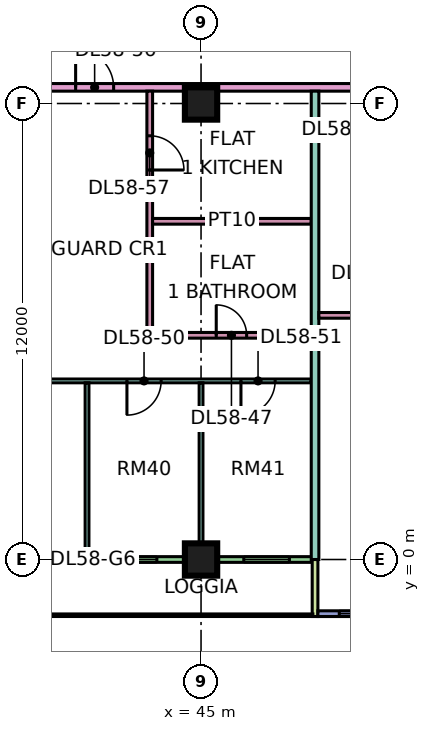
"""IFC4 building model, lengths in metres.
Left out: names, types, materials, properties, quantities, classifications, styles, units other than length and angle.
Written with IfcOpenShell. Run it as: python <this file> out.ifc"""

import sys

from ifc_helpers import new_model, si_unit, direction, frame, frame_2d, origin, origin_2d, place, context, subcontext, project, spatial, rectangle, extrude, element, fill, save


model = new_model("IFC4")
c1 = context("Model", 3, precision=1e-05, world=origin(), true_north=direction((0.0, 1.0)))
c2 = subcontext(c1, "Body", "Model", "MODEL_VIEW")
j1 = project(units=[si_unit("LENGTHUNIT", "METRE"), si_unit("PLANEANGLEUNIT", "RADIAN")], contexts=[c1])
p1 = place(None, origin())
s1 = spatial("IfcSite", under=j1, at=p1, CompositionType="ELEMENT")
p2 = place(p1, origin())
s2 = spatial("IfcBuilding", under=s1, at=p2, CompositionType="ELEMENT")
p3 = place(p2, frame((0.0, 0.0, 245.4)))
s3 = spatial("IfcBuildingStorey", under=s2, at=p3, CompositionType="ELEMENT", Elevation=245.4)
for number, where, z_axis, x_axis in (
    (1, (45.0, 0.0, 0.0), (0.0, 0.0, 1.0), (1.0, 0.0, 0.0)),
    (2, (45.0, 12.0, 0.0), (0.0, 0.0, 1.0), (1.0, 0.0, 0.0)),
):
    element("IfcColumn", number, at=place(p3, frame(where, z_axis=z_axis, x_axis=x_axis)), inside=s3, PredefinedType="COLUMN", context=c2, shape_type="SweptSolid", body=[
        extrude(rectangle(XDim=0.85, YDim=0.85, at=origin_2d()), origin(), (0.0, 0.0, 1.0), 3.75),
    ])
p4 = place(p3, frame((36.075, 0.0, 0.0), z_axis=(0.0, 0.0, 1.0), x_axis=(1.0, 0.0, 0.0)))
e3 = element("IfcWall", 3, at=p4, inside=s3, PredefinedType="SOLIDWALL", context=c2, shape_type="SweptSolid", body=[
    extrude(rectangle(XDim=11.85, YDim=0.15, at=frame_2d((5.925, 0.0))), origin(), (0.0, 0.0, 1.0), 3.35),
])
p5 = place(p4, frame((2.288, 0.0, 0.0)))
e4 = element("IfcOpeningElement", 4, at=p5, cuts=e3, PredefinedType="OPENING", context=c2, shape_type="SweptSolid", body=[
    extrude(rectangle(XDim=1.8, YDim=2.4, at=frame_2d((0.9, 1.2))), frame((0.0, 0.085, 0.0), z_axis=(0.0, -1.0, 0.0), x_axis=(1.0, 0.0, 0.0)), (0.0, 0.0, 1.0), 0.17),
])
p6 = place(p4, frame((6.562, 0.0, 0.45)))
e5 = element("IfcOpeningElement", 5, at=p6, cuts=e3, PredefinedType="OPENING", context=c2, shape_type="SweptSolid", body=[
    extrude(rectangle(XDim=1.2, YDim=2.4, at=frame_2d((0.6, 1.2))), frame((0.0, 0.085, 0.0), z_axis=(0.0, -1.0, 0.0), x_axis=(1.0, 0.0, 0.0)), (0.0, 0.0, 1.0), 0.17),
])
p7 = place(p4, frame((10.05, 0.0, 0.45)))
e6 = element("IfcOpeningElement", 6, at=p7, cuts=e3, PredefinedType="OPENING", context=c2, shape_type="SweptSolid", body=[
    extrude(rectangle(XDim=1.2, YDim=2.4, at=frame_2d((0.6, 1.2))), frame((0.0, 0.085, 0.0), z_axis=(0.0, -1.0, 0.0), x_axis=(1.0, 0.0, 0.0)), (0.0, 0.0, 1.0), 0.17),
])
p8 = place(p3, frame((48.0, -1.5, 0.0), z_axis=(0.0, 0.0, 1.0), x_axis=(0.0, 1.0, 0.0)))
e7 = element("IfcWall", 7, at=p8, inside=s3, PredefinedType="SOLIDWALL", context=c2, shape_type="SweptSolid", body=[
    extrude(rectangle(XDim=1.5, YDim=0.15, at=frame_2d((0.75, 0.0))), origin(), (0.0, 0.0, 1.0), 3.35),
])
p9 = place(p3, frame((48.075, -1.425, 0.0), z_axis=(0.0, 0.0, 1.0), x_axis=(1.0, 0.0, 0.0)))
e8 = element("IfcWall", 8, at=p9, inside=s3, PredefinedType="SOLIDWALL", context=c2, shape_type="SweptSolid", body=[
    extrude(rectangle(XDim=13.425, YDim=0.15, at=frame_2d((6.712, 0.0))), origin(), (0.0, 0.0, 1.0), 3.35),
])
p10 = place(p9, frame((0.562, 0.0, 0.45)))
e9 = element("IfcOpeningElement", 9, at=p10, cuts=e8, PredefinedType="OPENING", context=c2, shape_type="SweptSolid", body=[
    extrude(rectangle(XDim=1.8, YDim=2.4, at=frame_2d((0.9, 1.2))), frame((0.0, 0.085, 0.0), z_axis=(0.0, -1.0, 0.0), x_axis=(1.0, 0.0, 0.0)), (0.0, 0.0, 1.0), 0.17),
])
p11 = place(p9, frame((4.425, 0.0, 0.45)))
e10 = element("IfcOpeningElement", 10, at=p11, cuts=e8, PredefinedType="OPENING", context=c2, shape_type="SweptSolid", body=[
    extrude(rectangle(XDim=3.0, YDim=2.4, at=frame_2d((1.5, 1.2))), frame((0.0, 0.085, 0.0), z_axis=(0.0, -1.0, 0.0), x_axis=(1.0, 0.0, 0.0)), (0.0, 0.0, 1.0), 0.17),
])
p12 = place(p9, frame((9.375, 0.0, 0.45)))
e11 = element("IfcOpeningElement", 11, at=p12, cuts=e8, PredefinedType="OPENING", context=c2, shape_type="SweptSolid", body=[
    extrude(rectangle(XDim=3.6, YDim=2.4, at=frame_2d((1.8, 1.2))), frame((0.0, 0.085, 0.0), z_axis=(0.0, -1.0, 0.0), x_axis=(1.0, 0.0, 0.0)), (0.0, 0.0, 1.0), 0.17),
])
p13 = place(p3, frame((33.05, 4.7, 0.0), z_axis=(0.0, 0.0, 1.0), x_axis=(1.0, 0.0, 0.0)))
e12 = element("IfcWall", 12, at=p13, inside=s3, PredefinedType="PARTITIONING", context=c2, shape_type="SweptSolid", body=[
    extrude(rectangle(XDim=14.85, YDim=0.1, at=frame_2d((7.425, 0.0))), origin(), (0.0, 0.0, 1.0), 3.35),
])
p14 = place(p13, frame((10.0, 0.0, 0.0)))
e13 = element("IfcOpeningElement", 13, at=p14, cuts=e12, PredefinedType="OPENING", context=c2, shape_type="SweptSolid", body=[
    extrude(rectangle(XDim=0.9, YDim=2.1, at=frame_2d((0.45, 1.05))), frame((0.0, 0.06, 0.0), z_axis=(0.0, -1.0, 0.0), x_axis=(1.0, 0.0, 0.0)), (0.0, 0.0, 1.0), 0.12),
])
p15 = place(p13, frame((13.0, 0.0, 0.0)))
e14 = element("IfcOpeningElement", 14, at=p15, cuts=e12, PredefinedType="OPENING", context=c2, shape_type="SweptSolid", body=[
    extrude(rectangle(XDim=0.9, YDim=2.1, at=frame_2d((0.45, 1.05))), frame((0.0, 0.06, 0.0), z_axis=(0.0, -1.0, 0.0), x_axis=(1.0, 0.0, 0.0)), (0.0, 0.0, 1.0), 0.12),
])
p16 = place(p13, frame((4.0, 0.0, 0.0)))
e15 = element("IfcOpeningElement", 15, at=p16, cuts=e12, PredefinedType="OPENING", context=c2, shape_type="SweptSolid", body=[
    extrude(rectangle(XDim=0.9, YDim=2.1, at=frame_2d((0.45, 1.05))), frame((0.0, 0.06, 0.0), z_axis=(0.0, -1.0, 0.0), x_axis=(1.0, 0.0, 0.0)), (0.0, 0.0, 1.0), 0.12),
])
p17 = place(p3, frame((40.65, 12.425, 0.0), z_axis=(0.0, 0.0, 1.0), x_axis=(1.0, 0.0, 0.0)))
e16 = element("IfcWall", 16, at=p17, inside=s3, PredefinedType="PARTITIONING", context=c2, shape_type="SweptSolid", body=[
    extrude(rectangle(XDim=22.276, YDim=0.2, at=frame_2d((11.138, 0.0))), origin(), (0.0, 0.0, 1.0), 3.35),
])
p18 = place(p17, frame((8.7, 0.0, 0.0)))
e17 = element("IfcOpeningElement", 17, at=p18, cuts=e16, PredefinedType="OPENING", context=c2, shape_type="SweptSolid", body=[
    extrude(rectangle(XDim=1.0, YDim=2.1, at=frame_2d((0.5, 1.05))), frame((0.0, 0.11, 0.0), z_axis=(0.0, -1.0, 0.0), x_axis=(1.0, 0.0, 0.0)), (0.0, 0.0, 1.0), 0.22),
])
p19 = place(p17, frame((1.05, 0.0, 0.0)))
e18 = element("IfcOpeningElement", 18, at=p19, cuts=e16, PredefinedType="OPENING", context=c2, shape_type="SweptSolid", body=[
    extrude(rectangle(XDim=1.0, YDim=2.1, at=frame_2d((0.5, 1.05))), frame((0.0, 0.11, 0.0), z_axis=(0.0, -1.0, 0.0), x_axis=(1.0, 0.0, 0.0)), (0.0, 0.0, 1.0), 0.22),
])
p20 = place(p3, frame((42.0, 0.074, 0.0), z_axis=(0.0, 0.0, 1.0), x_axis=(0.0, 1.0, 0.0)))
e19 = element("IfcWall", 19, at=p20, inside=s3, PredefinedType="PARTITIONING", context=c2, shape_type="SweptSolid", body=[
    extrude(rectangle(XDim=4.576, YDim=0.1, at=frame_2d((2.288, 0.0))), origin(), (0.0, 0.0, 1.0), 3.35),
])
p21 = place(p3, frame((43.65, 5.825, 0.0), z_axis=(0.0, 0.0, 1.0), x_axis=(0.0, 1.0, 0.0)))
e20 = element("IfcWall", 20, at=p21, inside=s3, PredefinedType="PARTITIONING", context=c2, shape_type="SweptSolid", body=[
    extrude(rectangle(XDim=6.5, YDim=0.15, at=frame_2d((3.25, 0.0))), origin(), (0.0, 0.0, 1.0), 3.35),
])
p22 = place(p21, frame((4.425, 0.0, 0.0)))
e21 = element("IfcOpeningElement", 21, at=p22, cuts=e20, PredefinedType="OPENING", context=c2, shape_type="SweptSolid", body=[
    extrude(rectangle(XDim=0.9, YDim=2.1, at=frame_2d((0.45, 1.05))), frame((0.0, 0.085, 0.0), z_axis=(0.0, -1.0, 0.0), x_axis=(1.0, 0.0, 0.0)), (0.0, 0.0, 1.0), 0.17),
])
p23 = place(p3, frame((43.725, 5.9, 0.0), z_axis=(0.0, 0.0, 1.0), x_axis=(1.0, 0.0, 0.0)))
e22 = element("IfcWall", 22, at=p23, inside=s3, PredefinedType="PARTITIONING", context=c2, shape_type="SweptSolid", body=[
    extrude(rectangle(XDim=4.175, YDim=0.15, at=frame_2d((2.087, 0.0))), origin(), (0.0, 0.0, 1.0), 3.35),
])
p24 = place(p23, frame((1.675, 0.0, 0.0)))
e23 = element("IfcOpeningElement", 23, at=p24, cuts=e22, PredefinedType="OPENING", context=c2, shape_type="SweptSolid", body=[
    extrude(rectangle(XDim=0.8, YDim=2.1, at=frame_2d((0.4, 1.05))), frame((0.0, 0.085, 0.0), z_axis=(0.0, -1.0, 0.0), x_axis=(1.0, 0.0, 0.0)), (0.0, 0.0, 1.0), 0.17),
])
p25 = place(p3, frame((43.725, 8.9, 0.0), z_axis=(0.0, 0.0, 1.0), x_axis=(1.0, 0.0, 0.0)))
e24 = element("IfcWall", 24, at=p25, inside=s3, PredefinedType="PARTITIONING", context=c2, shape_type="SweptSolid", body=[
    extrude(rectangle(XDim=4.175, YDim=0.15, at=frame_2d((2.087, 0.0))), origin(), (0.0, 0.0, 1.0), 3.35),
])
p26 = place(p3, frame((45.0, 0.074, 0.0), z_axis=(0.0, 0.0, 1.0), x_axis=(0.0, 1.0, 0.0)))
e25 = element("IfcWall", 25, at=p26, inside=s3, PredefinedType="PARTITIONING", context=c2, shape_type="SweptSolid", body=[
    extrude(rectangle(XDim=4.576, YDim=0.1, at=frame_2d((2.288, 0.0))), origin(), (0.0, 0.0, 1.0), 3.35),
])
p27 = place(p3, frame((48.0, 0.0, 0.0), z_axis=(0.0, 0.0, 1.0), x_axis=(0.0, 1.0, 0.0)))
e26 = element("IfcWall", 26, at=p27, inside=s3, PredefinedType="PARTITIONING", context=c2, shape_type="SweptSolid", body=[
    extrude(rectangle(XDim=12.325, YDim=0.2, at=frame_2d((6.163, 0.0))), origin(), (0.0, 0.0, 1.0), 3.35),
])
p28 = place(p3, frame((48.1, 6.425, 0.0), z_axis=(0.0, 0.0, 1.0), x_axis=(1.0, 0.0, 0.0)))
e27 = element("IfcWall", 27, at=p28, inside=s3, PredefinedType="PARTITIONING", context=c2, shape_type="SweptSolid", body=[
    extrude(rectangle(XDim=8.95, YDim=0.15, at=frame_2d((4.475, 0.0))), origin(), (0.0, 0.0, 1.0), 3.35),
])
p29 = place(p28, frame((0.95, 0.0, 0.0)))
e28 = element("IfcOpeningElement", 28, at=p29, cuts=e27, PredefinedType="OPENING", context=c2, shape_type="SweptSolid", body=[
    extrude(rectangle(XDim=0.9, YDim=2.1, at=frame_2d((0.45, 1.05))), frame((0.0, 0.085, 0.0), z_axis=(0.0, -1.0, 0.0), x_axis=(1.0, 0.0, 0.0)), (0.0, 0.0, 1.0), 0.17),
])
p30 = place(p28, frame((6.95, 0.0, 0.0)))
e29 = element("IfcOpeningElement", 29, at=p30, cuts=e27, PredefinedType="OPENING", context=c2, shape_type="SweptSolid", body=[
    extrude(rectangle(XDim=0.9, YDim=2.1, at=frame_2d((0.45, 1.05))), frame((0.0, 0.085, 0.0), z_axis=(0.0, -1.0, 0.0), x_axis=(1.0, 0.0, 0.0)), (0.0, 0.0, 1.0), 0.17),
])
p31 = place(p6, origin())
e30 = element("IfcWindow", 30, at=p31, inside=s3, PartitioningType="SINGLE_PANEL", PredefinedType="WINDOW", context=c2, shape_type="SweptSolid", body=[
    extrude(rectangle(XDim=1.2, YDim=2.4, at=frame_2d((0.6, 1.2))), frame((0.0, 0.03, 0.0), z_axis=(0.0, -1.0, 0.0), x_axis=(1.0, 0.0, 0.0)), (0.0, 0.0, 1.0), 0.06),
])
fill(e5, e30)
p32 = place(p7, origin())
e31 = element("IfcWindow", 31, at=p32, inside=s3, PartitioningType="SINGLE_PANEL", PredefinedType="WINDOW", context=c2, shape_type="SweptSolid", body=[
    extrude(rectangle(XDim=1.2, YDim=2.4, at=frame_2d((0.6, 1.2))), frame((0.0, 0.03, 0.0), z_axis=(0.0, -1.0, 0.0), x_axis=(1.0, 0.0, 0.0)), (0.0, 0.0, 1.0), 0.06),
])
fill(e6, e31)
p33 = place(p10, origin())
e32 = element("IfcWindow", 32, at=p33, inside=s3, PartitioningType="SINGLE_PANEL", PredefinedType="WINDOW", context=c2, shape_type="SweptSolid", body=[
    extrude(rectangle(XDim=1.8, YDim=2.4, at=frame_2d((0.9, 1.2))), frame((0.0, 0.03, 0.0), z_axis=(0.0, -1.0, 0.0), x_axis=(1.0, 0.0, 0.0)), (0.0, 0.0, 1.0), 0.06),
])
fill(e9, e32)
p34 = place(p24, origin())
e33 = element("IfcDoor", 33, at=p34, inside=s3, OperationType="SINGLE_SWING_LEFT", PredefinedType="DOOR", context=c2, shape_type="SweptSolid", body=[
    extrude(rectangle(XDim=0.8, YDim=2.1, at=frame_2d((0.4, 1.05))), frame((0.0, 0.025, 0.0), z_axis=(0.0, -1.0, 0.0), x_axis=(1.0, 0.0, 0.0)), (0.0, 0.0, 1.0), 0.05),
])
fill(e23, e33)
p35 = place(p14, frame((0.9, 0.0, 0.0), z_axis=(0.0, 0.0, 1.0), x_axis=(-1.0, 0.0, 0.0)))
e34 = element("IfcDoor", 34, at=p35, inside=s3, OperationType="SINGLE_SWING_LEFT", PredefinedType="DOOR", context=c2, shape_type="SweptSolid", body=[
    extrude(rectangle(XDim=0.9, YDim=2.1, at=frame_2d((0.45, 1.05))), frame((0.0, 0.025, 0.0), z_axis=(0.0, -1.0, 0.0), x_axis=(1.0, 0.0, 0.0)), (0.0, 0.0, 1.0), 0.05),
])
fill(e13, e34)
p36 = place(p15, frame((0.9, 0.0, 0.0), z_axis=(0.0, 0.0, 1.0), x_axis=(-1.0, 0.0, 0.0)))
e35 = element("IfcDoor", 35, at=p36, inside=s3, OperationType="SINGLE_SWING_LEFT", PredefinedType="DOOR", context=c2, shape_type="SweptSolid", body=[
    extrude(rectangle(XDim=0.9, YDim=2.1, at=frame_2d((0.45, 1.05))), frame((0.0, 0.025, 0.0), z_axis=(0.0, -1.0, 0.0), x_axis=(1.0, 0.0, 0.0)), (0.0, 0.0, 1.0), 0.05),
])
fill(e14, e35)
p37 = place(p19, origin())
e36 = element("IfcDoor", 36, at=p37, inside=s3, OperationType="SINGLE_SWING_LEFT", PredefinedType="DOOR", context=c2, shape_type="SweptSolid", body=[
    extrude(rectangle(XDim=1.0, YDim=2.1, at=frame_2d((0.5, 1.05))), frame((0.0, 0.025, 0.0), z_axis=(0.0, -1.0, 0.0), x_axis=(1.0, 0.0, 0.0)), (0.0, 0.0, 1.0), 0.05),
])
fill(e18, e36)
p38 = place(p22, frame((0.9, 0.0, 0.0), z_axis=(0.0, 0.0, 1.0), x_axis=(-1.0, 0.0, 0.0)))
e37 = element("IfcDoor", 37, at=p38, inside=s3, OperationType="SINGLE_SWING_LEFT", PredefinedType="DOOR", context=c2, shape_type="SweptSolid", body=[
    extrude(rectangle(XDim=0.9, YDim=2.1, at=frame_2d((0.45, 1.05))), frame((0.0, 0.025, 0.0), z_axis=(0.0, -1.0, 0.0), x_axis=(1.0, 0.0, 0.0)), (0.0, 0.0, 1.0), 0.05),
])
fill(e21, e37)
save(model, sys.argv[1])
